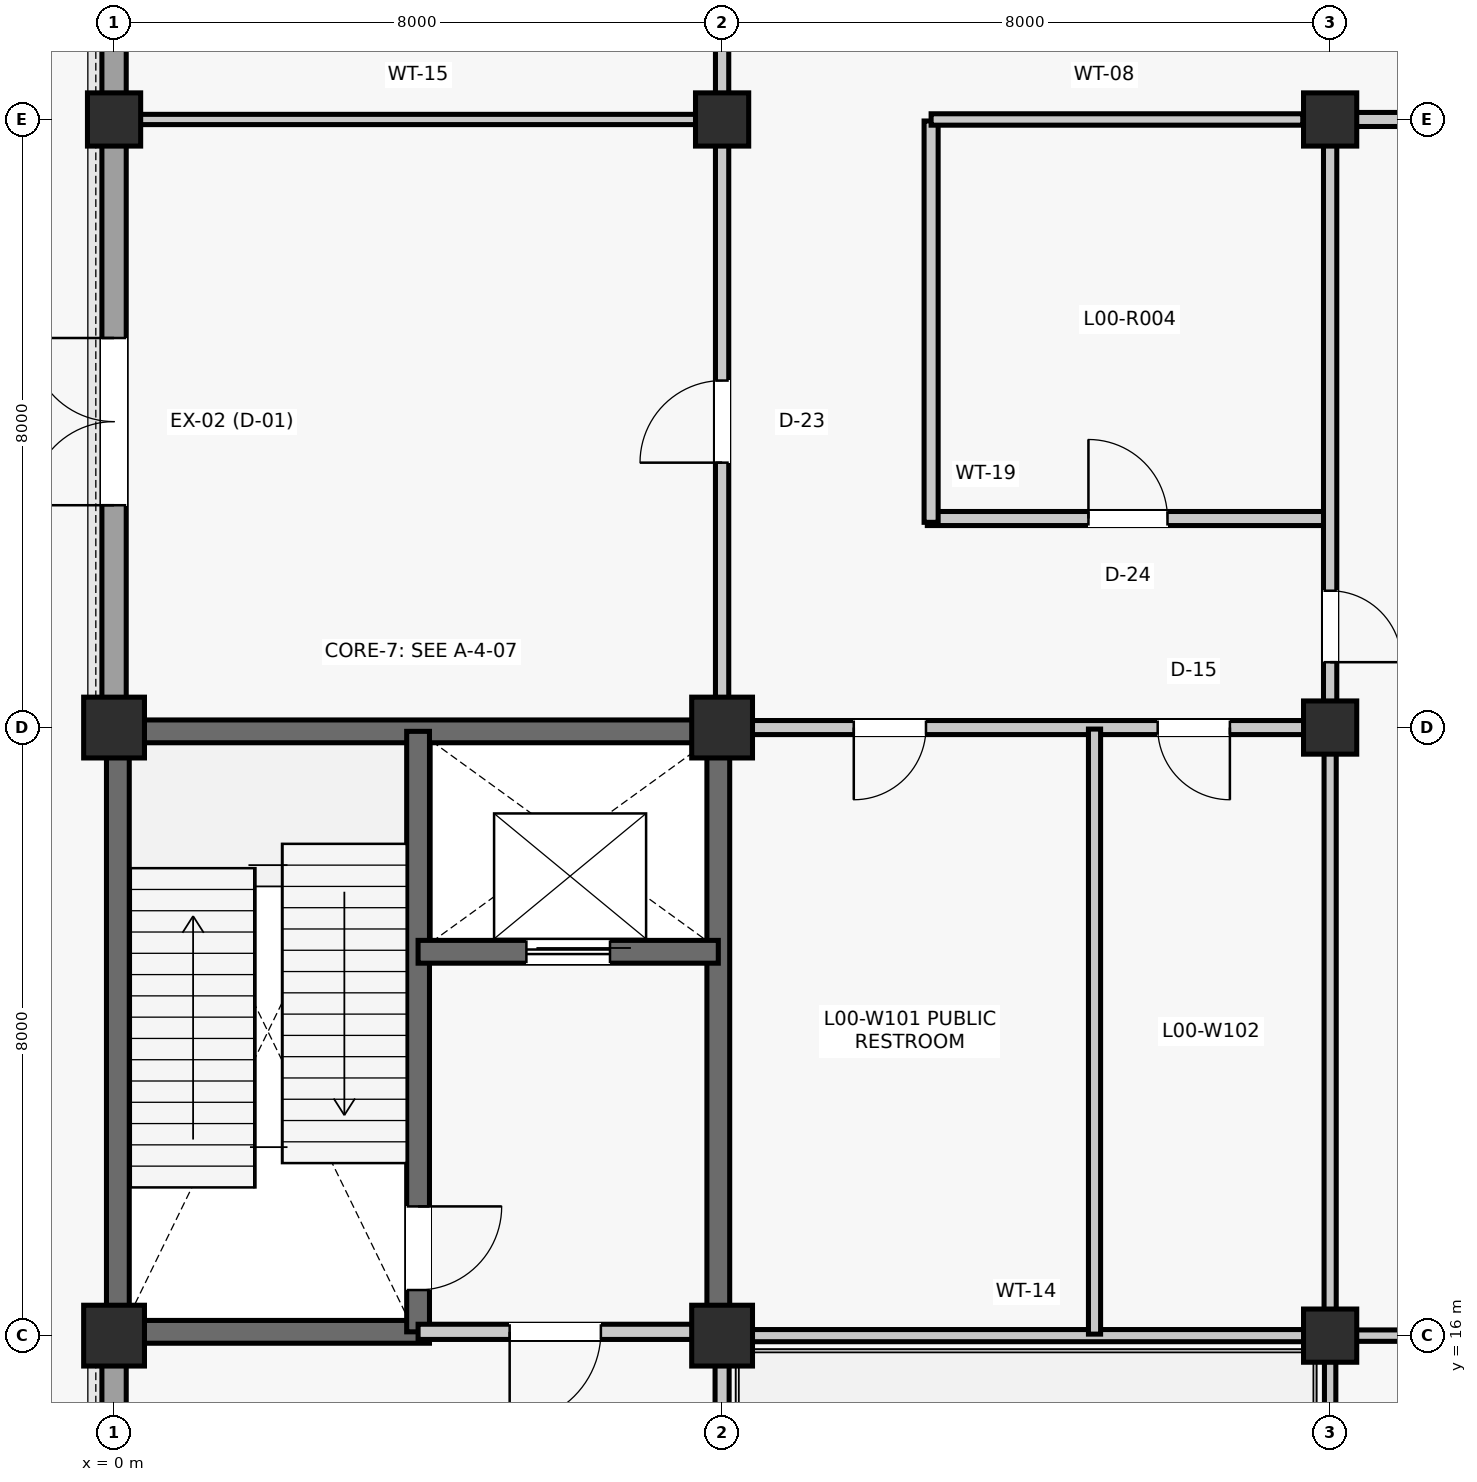
"""IFC4 building model, lengths in metres.
Left out: names, types, materials, properties, quantities, classifications, styles, units other than length and angle.
Written with IfcOpenShell. Run it as: python <this file> out.ifc"""

import sys

from ifc_helpers import new_model, si_unit, direction, frame, frame_2d, origin, origin_2d, place, context, subcontext, project, spatial, rectangle, extrude, element, fill, save


model = new_model("IFC4")
c1 = context("Model", 3, precision=1e-05, world=origin(), true_north=direction((0.0, 1.0)))
c2 = subcontext(c1, "Body", "Model", "MODEL_VIEW")
j1 = project(units=[si_unit("LENGTHUNIT", "METRE"), si_unit("PLANEANGLEUNIT", "RADIAN")], contexts=[c1])
p1 = place(None, origin())
s1 = spatial("IfcSite", under=j1, at=p1, CompositionType="ELEMENT")
p2 = place(p1, origin())
s2 = spatial("IfcBuilding", under=s1, at=p2, CompositionType="ELEMENT")
p3 = place(p2, origin())
s3 = spatial("IfcBuildingStorey", under=s2, at=p3, CompositionType="ELEMENT", Elevation=0.0)
for number, where, z_axis, x_axis in (
    (1, (0.0, 16.0, 0.0), (0.0, 0.0, 1.0), (1.0, 0.0, 0.0)),
    (2, (0.0, 24.0, 0.0), (0.0, 0.0, 1.0), (1.0, 0.0, 0.0)),
):
    element("IfcColumn", number, at=place(p3, frame(where, z_axis=z_axis, x_axis=x_axis)), inside=s3, PredefinedType="COLUMN", context=c2, shape_type="SweptSolid", body=[
        extrude(rectangle(XDim=0.8, YDim=0.8, at=origin_2d()), origin(), (0.0, 0.0, 1.0), 5.28),
    ])
p4 = place(p3, frame((0.0, 32.0, 0.0), z_axis=(0.0, 0.0, 1.0), x_axis=(1.0, 0.0, 0.0)))
e3 = element("IfcColumn", 3, at=p4, inside=s3, PredefinedType="COLUMN", context=c2, shape_type="SweptSolid", body=[
    extrude(rectangle(XDim=0.7, YDim=0.7, at=origin_2d()), origin(), (0.0, 0.0, 1.0), 5.28),
])
for number, where, z_axis, x_axis in (
    (4, (8.0, 16.0, 0.0), (0.0, 0.0, 1.0), (1.0, 0.0, 0.0)),
    (5, (8.0, 24.0, 0.0), (0.0, 0.0, 1.0), (1.0, 0.0, 0.0)),
):
    element("IfcColumn", number, at=place(p3, frame(where, z_axis=z_axis, x_axis=x_axis)), inside=s3, PredefinedType="COLUMN", context=c2, shape_type="SweptSolid", body=[
        extrude(rectangle(XDim=0.8, YDim=0.8, at=origin_2d()), origin(), (0.0, 0.0, 1.0), 5.28),
    ])
for number, where, z_axis, x_axis in (
    (6, (8.0, 32.0, 0.0), (0.0, 0.0, 1.0), (1.0, 0.0, 0.0)),
    (7, (16.0, 16.0, 0.0), (0.0, 0.0, 1.0), (1.0, 0.0, 0.0)),
    (8, (16.0, 24.0, 0.0), (0.0, 0.0, 1.0), (1.0, 0.0, 0.0)),
    (9, (16.0, 32.0, 0.0), (0.0, 0.0, 1.0), (1.0, 0.0, 0.0)),
):
    element("IfcColumn", number, at=place(p3, frame(where, z_axis=z_axis, x_axis=x_axis)), inside=s3, PredefinedType="COLUMN", context=c2, shape_type="SweptSolid", body=[
        extrude(rectangle(XDim=0.7, YDim=0.7, at=origin_2d()), origin(), (0.0, 0.0, 1.0), 5.28),
    ])
p5 = place(p3, frame((0.0, 8.335, 0.0), z_axis=(0.0, 0.0, 1.0), x_axis=(0.0, 1.0, 0.0)))
e10 = element("IfcWall", 10, at=p5, inside=s3, PredefinedType="SOLIDWALL", context=c2, shape_type="SweptSolid", body=[
    extrude(rectangle(XDim=7.28, YDim=0.32, at=frame_2d((3.64, 0.0))), origin(), (0.0, 0.0, 1.0), 4.674),
])
p6 = place(p5, frame((4.25, 0.0, 0.9)))
e11 = element("IfcOpeningElement", 11, at=p6, cuts=e10, PredefinedType="OPENING", context=c2, shape_type="SweptSolid", body=[
    extrude(rectangle(XDim=2.15, YDim=2.8, at=frame_2d((1.075, 1.4))), frame((0.0, 0.17, 0.0), z_axis=(0.0, -1.0, 0.0), x_axis=(1.0, 0.0, 0.0)), (0.0, 0.0, 1.0), 0.34),
])
p7 = place(p3, frame((0.0, 24.385, 0.0), z_axis=(0.0, 0.0, 1.0), x_axis=(0.0, 1.0, 0.0)))
e12 = element("IfcWall", 12, at=p7, inside=s3, PredefinedType="SOLIDWALL", context=c2, shape_type="SweptSolid", body=[
    extrude(rectangle(XDim=7.28, YDim=0.32, at=frame_2d((3.64, 0.0))), origin(), (0.0, 0.0, 1.0), 4.677),
])
p8 = place(p7, frame((2.54, 0.0, 0.0)))
e13 = element("IfcOpeningElement", 13, at=p8, cuts=e12, PredefinedType="OPENING", context=c2, shape_type="SweptSolid", body=[
    extrude(rectangle(XDim=2.2, YDim=2.5, at=frame_2d((1.1, 1.25))), frame((0.0, 0.17, 0.0), z_axis=(0.0, -1.0, 0.0), x_axis=(1.0, 0.0, 0.0)), (0.0, 0.0, 1.0), 0.34),
])
p9 = place(p3, frame((0.0, 32.335, 0.0), z_axis=(0.0, 0.0, 1.0), x_axis=(0.0, 1.0, 0.0)))
e14 = element("IfcWall", 14, at=p9, inside=s3, PredefinedType="SOLIDWALL", context=c2, shape_type="SweptSolid", body=[
    extrude(rectangle(XDim=7.33, YDim=0.32, at=frame_2d((3.665, 0.0))), origin(), (0.0, 0.0, 1.0), 4.61),
])
p10 = place(p9, frame((4.25, 0.0, 0.9)))
e15 = element("IfcOpeningElement", 15, at=p10, cuts=e14, PredefinedType="OPENING", context=c2, shape_type="SweptSolid", body=[
    extrude(rectangle(XDim=2.4, YDim=2.8, at=frame_2d((1.2, 1.4))), frame((0.0, 0.17, 0.0), z_axis=(0.0, -1.0, 0.0), x_axis=(1.0, 0.0, 0.0)), (0.0, 0.0, 1.0), 0.34),
])
for number, where, z_axis, x_axis in (
    (16, (0.05, 16.29, 0.0), (0.0, 0.0, 1.0), (0.0, 1.0, 0.0)),
    (17, (0.29, 23.95, 0.0), (0.0, 0.0, 1.0), (1.0, 0.0, 0.0)),
    (18, (7.95, 16.29, 0.0), (0.0, 0.0, 1.0), (0.0, 1.0, 0.0)),
):
    element("IfcWall", number, at=place(p3, frame(where, z_axis=z_axis, x_axis=x_axis)), inside=s3, PredefinedType="SHEAR", context=c2, shape_type="SweptSolid", body=[
        extrude(rectangle(XDim=7.42, YDim=0.3, at=frame_2d((3.71, 0.0))), origin(), (0.0, 0.0, 1.0), 5.035),
    ])
p11 = place(p3, frame((0.29, 16.05, 0.0), z_axis=(0.0, 0.0, 1.0), x_axis=(1.0, 0.0, 0.0)))
e19 = element("IfcWall", 19, at=p11, inside=s3, PredefinedType="SHEAR", context=c2, shape_type="SweptSolid", body=[
    extrude(rectangle(XDim=3.86, YDim=0.3, at=frame_2d((1.93, 0.0))), origin(), (0.0, 0.0, 1.0), 5.035),
])
p12 = place(p3, frame((4.0, 16.05, 0.0), z_axis=(0.0, 0.0, 1.0), x_axis=(0.0, 1.0, 0.0)))
e20 = element("IfcWall", 20, at=p12, inside=s3, PredefinedType="SHEAR", context=c2, shape_type="SweptSolid", body=[
    extrude(rectangle(XDim=7.9, YDim=0.3, at=frame_2d((3.95, 0.0))), origin(), (0.0, 0.0, 1.0), 5.035),
])
p13 = place(p12, frame((0.55, 0.0, 0.0)))
e21 = element("IfcOpeningElement", 21, at=p13, cuts=e20, PredefinedType="OPENING", context=c2, shape_type="SweptSolid", body=[
    extrude(rectangle(XDim=1.1, YDim=2.15, at=frame_2d((0.55, 1.075))), frame((0.0, 0.16, 0.0), z_axis=(0.0, -1.0, 0.0), x_axis=(1.0, 0.0, 0.0)), (0.0, 0.0, 1.0), 0.32),
])
p14 = place(p3, frame((4.0, 21.05, 0.0), z_axis=(0.0, 0.0, 1.0), x_axis=(1.0, 0.0, 0.0)))
e22 = element("IfcWall", 22, at=p14, inside=s3, PredefinedType="SHEAR", context=c2, shape_type="SweptSolid", body=[
    extrude(rectangle(XDim=3.95, YDim=0.3, at=frame_2d((1.975, 0.0))), origin(), (0.0, 0.0, 1.0), 5.035),
])
p15 = place(p14, frame((1.425, 0.0, 0.0)))
e23 = element("IfcOpeningElement", 23, at=p15, cuts=e22, PredefinedType="OPENING", context=c2, shape_type="SweptSolid", body=[
    extrude(rectangle(XDim=1.1, YDim=2.2, at=frame_2d((0.55, 1.1))), frame((0.0, 0.16, 0.0), z_axis=(0.0, -1.0, 0.0), x_axis=(1.0, 0.0, 0.0)), (0.0, 0.0, 1.0), 0.32),
])
p16 = place(p3, frame((4.0, 16.05, 0.0), z_axis=(0.0, 0.0, 1.0), x_axis=(1.0, 0.0, 0.0)))
e24 = element("IfcWall", 24, at=p16, inside=s3, PredefinedType="PARTITIONING", context=c2, shape_type="SweptSolid", body=[
    extrude(rectangle(XDim=3.61, YDim=0.2, at=frame_2d((1.805, 0.0))), origin(), (0.0, 0.0, 1.0), 4.336),
])
p17 = place(p16, frame((1.205, 0.0, 0.0)))
e25 = element("IfcOpeningElement", 25, at=p17, cuts=e24, PredefinedType="OPENING", context=c2, shape_type="SweptSolid", body=[
    extrude(rectangle(XDim=1.2, YDim=2.15, at=frame_2d((0.6, 1.075))), frame((0.0, 0.11, 0.0), z_axis=(0.0, -1.0, 0.0), x_axis=(1.0, 0.0, 0.0)), (0.0, 0.0, 1.0), 0.22),
])
p18 = place(p3, frame((10.7, 26.75, 0.0), z_axis=(0.0, 0.0, 1.0), x_axis=(1.0, 0.0, 0.0)))
e26 = element("IfcWall", 26, at=p18, inside=s3, PredefinedType="PARTITIONING", context=c2, shape_type="SweptSolid", body=[
    extrude(rectangle(XDim=5.28, YDim=0.185, at=frame_2d((2.64, 0.0))), origin(), (0.0, 0.0, 1.0), 4.667),
])
p19 = place(p18, frame((2.12, 0.0, 0.0)))
e27 = element("IfcOpeningElement", 27, at=p19, cuts=e26, PredefinedType="OPENING", context=c2, shape_type="SweptSolid", body=[
    extrude(rectangle(XDim=1.04, YDim=2.18, at=frame_2d((0.52, 1.09))), frame((0.0, 0.103, 0.0), z_axis=(0.0, -1.0, 0.0), x_axis=(1.0, 0.0, 0.0)), (0.0, 0.0, 1.0), 0.205),
])
p20 = place(p3, frame((10.75, 26.7, 0.0), z_axis=(0.0, 0.0, 1.0), x_axis=(0.0, 1.0, 0.0)))
e28 = element("IfcWall", 28, at=p20, inside=s3, PredefinedType="PARTITIONING", context=c2, shape_type="SweptSolid", body=[
    extrude(rectangle(XDim=5.28, YDim=0.185, at=frame_2d((2.64, 0.0))), origin(), (0.0, 0.0, 1.0), 4.403),
])
p21 = place(p3, frame((10.75, 32.0, 0.0), z_axis=(0.0, 0.0, 1.0), x_axis=(1.0, 0.0, 0.0)))
e29 = element("IfcWall", 29, at=p21, inside=s3, PredefinedType="PARTITIONING", context=c2, shape_type="SweptSolid", body=[
    extrude(rectangle(XDim=4.89, YDim=0.15, at=frame_2d((2.445, 0.0))), origin(), (0.0, 0.0, 1.0), 4.403),
])
p22 = place(p3, frame((8.0, 8.34, 0.0), z_axis=(0.0, 0.0, 1.0), x_axis=(0.0, 1.0, 0.0)))
e30 = element("IfcWall", 30, at=p22, inside=s3, PredefinedType="PARTITIONING", context=c2, shape_type="SweptSolid", body=[
    extrude(rectangle(XDim=7.27, YDim=0.185, at=frame_2d((3.635, 0.0))), origin(), (0.0, 0.0, 1.0), 4.404),
])
p23 = place(p22, frame((2.985, 0.0, 0.0)))
e31 = element("IfcOpeningElement", 31, at=p23, cuts=e30, PredefinedType="OPENING", context=c2, shape_type="SweptSolid", body=[
    extrude(rectangle(XDim=1.3, YDim=2.2, at=frame_2d((0.65, 1.1))), frame((0.0, 0.103, 0.0), z_axis=(0.0, -1.0, 0.0), x_axis=(1.0, 0.0, 0.0)), (0.0, 0.0, 1.0), 0.205),
])
p24 = place(p3, frame((8.0, 24.39, 0.0), z_axis=(0.0, 0.0, 1.0), x_axis=(0.0, 1.0, 0.0)))
e32 = element("IfcWall", 32, at=p24, inside=s3, PredefinedType="PARTITIONING", context=c2, shape_type="SweptSolid", body=[
    extrude(rectangle(XDim=7.27, YDim=0.175, at=frame_2d((3.635, 0.0))), origin(), (0.0, 0.0, 1.0), 4.403),
])
p25 = place(p24, frame((3.095, 0.0, 0.0)))
e33 = element("IfcOpeningElement", 33, at=p25, cuts=e32, PredefinedType="OPENING", context=c2, shape_type="SweptSolid", body=[
    extrude(rectangle(XDim=1.08, YDim=2.2, at=frame_2d((0.54, 1.1))), frame((0.0, 0.097, 0.0), z_axis=(0.0, -1.0, 0.0), x_axis=(1.0, 0.0, 0.0)), (0.0, 0.0, 1.0), 0.195),
])
p26 = place(p3, frame((0.34, 32.0, 0.0), z_axis=(0.0, 0.0, 1.0), x_axis=(1.0, 0.0, 0.0)))
e34 = element("IfcWall", 34, at=p26, inside=s3, PredefinedType="PARTITIONING", context=c2, shape_type="SweptSolid", body=[
    extrude(rectangle(XDim=7.32, YDim=0.135, at=frame_2d((3.66, 0.0))), origin(), (0.0, 0.0, 1.0), 4.327),
])
p27 = place(p3, frame((8.0, 32.34, 0.0), z_axis=(0.0, 0.0, 1.0), x_axis=(0.0, 1.0, 0.0)))
e35 = element("IfcWall", 35, at=p27, inside=s3, PredefinedType="PARTITIONING", context=c2, shape_type="SweptSolid", body=[
    extrude(rectangle(XDim=7.32, YDim=0.175, at=frame_2d((3.66, 0.0))), origin(), (0.0, 0.0, 1.0), 4.412),
])
p28 = place(p27, frame((3.18, 0.0, 0.0)))
e36 = element("IfcOpeningElement", 36, at=p28, cuts=e35, PredefinedType="OPENING", context=c2, shape_type="SweptSolid", body=[
    extrude(rectangle(XDim=0.96, YDim=2.14, at=frame_2d((0.48, 1.07))), frame((0.0, 0.097, 0.0), z_axis=(0.0, -1.0, 0.0), x_axis=(1.0, 0.0, 0.0)), (0.0, 0.0, 1.0), 0.195),
])
p29 = place(p3, frame((16.0, 8.34, 0.0), z_axis=(0.0, 0.0, 1.0), x_axis=(0.0, 1.0, 0.0)))
e37 = element("IfcWall", 37, at=p29, inside=s3, PredefinedType="PARTITIONING", context=c2, shape_type="SweptSolid", body=[
    extrude(rectangle(XDim=7.32, YDim=0.15, at=frame_2d((3.66, 0.0))), origin(), (0.0, 0.0, 1.0), 4.471),
])
p30 = place(p3, frame((8.39, 16.0, 0.0), z_axis=(0.0, 0.0, 1.0), x_axis=(1.0, 0.0, 0.0)))
e38 = element("IfcWall", 38, at=p30, inside=s3, PredefinedType="PARTITIONING", context=c2, shape_type="SweptSolid", body=[
    extrude(rectangle(XDim=7.27, YDim=0.16, at=frame_2d((3.635, 0.0))), origin(), (0.0, 0.0, 1.0), 4.404),
])
p31 = place(p3, frame((16.0, 16.34, 0.0), z_axis=(0.0, 0.0, 1.0), x_axis=(0.0, 1.0, 0.0)))
e39 = element("IfcWall", 39, at=p31, inside=s3, PredefinedType="PARTITIONING", context=c2, shape_type="SweptSolid", body=[
    extrude(rectangle(XDim=7.32, YDim=0.16, at=frame_2d((3.66, 0.0))), origin(), (0.0, 0.0, 1.0), 4.603),
])
p32 = place(p3, frame((8.39, 24.0, 0.0), z_axis=(0.0, 0.0, 1.0), x_axis=(1.0, 0.0, 0.0)))
e40 = element("IfcWall", 40, at=p32, inside=s3, PredefinedType="PARTITIONING", context=c2, shape_type="SweptSolid", body=[
    extrude(rectangle(XDim=7.27, YDim=0.185, at=frame_2d((3.635, 0.0))), origin(), (0.0, 0.0, 1.0), 4.327),
])
p33 = place(p32, frame((1.343, 0.0, 0.0)))
e41 = element("IfcOpeningElement", 41, at=p33, cuts=e40, PredefinedType="OPENING", context=c2, shape_type="SweptSolid", body=[
    extrude(rectangle(XDim=0.95, YDim=2.1, at=frame_2d((0.475, 1.05))), frame((0.0, 0.103, 0.0), z_axis=(0.0, -1.0, 0.0), x_axis=(1.0, 0.0, 0.0)), (0.0, 0.0, 1.0), 0.205),
])
p34 = place(p32, frame((5.341, 0.0, 0.0)))
e42 = element("IfcOpeningElement", 42, at=p34, cuts=e40, PredefinedType="OPENING", context=c2, shape_type="SweptSolid", body=[
    extrude(rectangle(XDim=0.95, YDim=2.1, at=frame_2d((0.475, 1.05))), frame((0.0, 0.103, 0.0), z_axis=(0.0, -1.0, 0.0), x_axis=(1.0, 0.0, 0.0)), (0.0, 0.0, 1.0), 0.205),
])
p35 = place(p3, frame((16.0, 24.34, 0.0), z_axis=(0.0, 0.0, 1.0), x_axis=(0.0, 1.0, 0.0)))
e43 = element("IfcWall", 43, at=p35, inside=s3, PredefinedType="PARTITIONING", context=c2, shape_type="SweptSolid", body=[
    extrude(rectangle(XDim=7.32, YDim=0.175, at=frame_2d((3.66, 0.0))), origin(), (0.0, 0.0, 1.0), 4.667),
])
p36 = place(p35, frame((0.52, 0.0, 0.0)))
e44 = element("IfcOpeningElement", 44, at=p36, cuts=e43, PredefinedType="OPENING", context=c2, shape_type="SweptSolid", body=[
    extrude(rectangle(XDim=0.94, YDim=2.12, at=frame_2d((0.47, 1.06))), frame((0.0, 0.097, 0.0), z_axis=(0.0, -1.0, 0.0), x_axis=(1.0, 0.0, 0.0)), (0.0, 0.0, 1.0), 0.195),
])
p37 = place(p3, frame((16.34, 16.0, 0.0), z_axis=(0.0, 0.0, 1.0), x_axis=(1.0, 0.0, 0.0)))
e45 = element("IfcWall", 45, at=p37, inside=s3, PredefinedType="PARTITIONING", context=c2, shape_type="SweptSolid", body=[
    extrude(rectangle(XDim=7.32, YDim=0.15, at=frame_2d((3.66, 0.0))), origin(), (0.0, 0.0, 1.0), 4.603),
])
p38 = place(p3, frame((16.34, 32.0, 0.0), z_axis=(0.0, 0.0, 1.0), x_axis=(1.0, 0.0, 0.0)))
e46 = element("IfcWall", 46, at=p38, inside=s3, PredefinedType="PARTITIONING", context=c2, shape_type="SweptSolid", body=[
    extrude(rectangle(XDim=7.32, YDim=0.185, at=frame_2d((3.66, 0.0))), origin(), (0.0, 0.0, 1.0), 4.607),
])
p39 = place(p38, frame((2.76, 0.0, 0.0)))
e47 = element("IfcOpeningElement", 47, at=p39, cuts=e46, PredefinedType="OPENING", context=c2, shape_type="SweptSolid", body=[
    extrude(rectangle(XDim=1.8, YDim=2.35, at=frame_2d((0.9, 1.175))), frame((0.0, 0.103, 0.0), z_axis=(0.0, -1.0, 0.0), x_axis=(1.0, 0.0, 0.0)), (0.0, 0.0, 1.0), 0.205),
])
p40 = place(p3, frame((12.9, 16.02, 0.0), z_axis=(0.0, 0.0, 1.0), x_axis=(0.0, 1.0, 0.0)))
e48 = element("IfcWall", 48, at=p40, inside=s3, PredefinedType="PARTITIONING", context=c2, shape_type="SweptSolid", body=[
    extrude(rectangle(XDim=7.96, YDim=0.16, at=frame_2d((3.98, 0.0))), origin(), (0.0, 0.0, 1.0), 4.327),
])
p41 = place(p8, origin())
e49 = element("IfcDoor", 49, at=p41, inside=s3, OperationType="DOUBLE_DOOR_SINGLE_SWING", PredefinedType="DOOR", context=c2, shape_type="SweptSolid", body=[
    extrude(rectangle(XDim=2.2, YDim=2.5, at=frame_2d((1.1, 1.25))), frame((0.0, 0.025, 0.0), z_axis=(0.0, -1.0, 0.0), x_axis=(1.0, 0.0, 0.0)), (0.0, 0.0, 1.0), 0.05),
])
fill(e13, e49)
p42 = place(p13, frame((1.1, 0.0, 0.0), z_axis=(0.0, 0.0, 1.0), x_axis=(-1.0, 0.0, 0.0)))
e50 = element("IfcDoor", 50, at=p42, inside=s3, OperationType="SINGLE_SWING_RIGHT", PredefinedType="DOOR", context=c2, shape_type="SweptSolid", body=[
    extrude(rectangle(XDim=1.1, YDim=2.15, at=frame_2d((0.55, 1.075))), frame((0.0, 0.025, 0.0), z_axis=(0.0, -1.0, 0.0), x_axis=(1.0, 0.0, 0.0)), (0.0, 0.0, 1.0), 0.05),
])
fill(e21, e50)
p43 = place(p15, origin())
e51 = element("IfcDoor", 51, at=p43, inside=s3, OperationType="SLIDING_TO_LEFT", PredefinedType="DOOR", context=c2, shape_type="SweptSolid", body=[
    extrude(rectangle(XDim=1.1, YDim=2.2, at=frame_2d((0.55, 1.1))), frame((0.0, 0.025, 0.0), z_axis=(0.0, -1.0, 0.0), x_axis=(1.0, 0.0, 0.0)), (0.0, 0.0, 1.0), 0.05),
])
fill(e23, e51)
p44 = place(p17, frame((1.2, 0.0, 0.0), z_axis=(0.0, 0.0, 1.0), x_axis=(-1.0, 0.0, 0.0)))
e52 = element("IfcDoor", 52, at=p44, inside=s3, OperationType="SINGLE_SWING_LEFT", PredefinedType="DOOR", context=c2, shape_type="SweptSolid", body=[
    extrude(rectangle(XDim=1.2, YDim=2.15, at=frame_2d((0.6, 1.075))), frame((0.0, 0.025, 0.0), z_axis=(0.0, -1.0, 0.0), x_axis=(1.0, 0.0, 0.0)), (0.0, 0.0, 1.0), 0.05),
])
fill(e25, e52)
p45 = place(p19, origin())
e53 = element("IfcDoor", 53, at=p45, inside=s3, OperationType="SINGLE_SWING_LEFT", PredefinedType="DOOR", context=c2, shape_type="SweptSolid", body=[
    extrude(rectangle(XDim=1.04, YDim=2.18, at=frame_2d((0.52, 1.09))), frame((0.0, 0.025, 0.0), z_axis=(0.0, -1.0, 0.0), x_axis=(1.0, 0.0, 0.0)), (0.0, 0.0, 1.0), 0.05),
])
fill(e27, e53)
p46 = place(p25, origin())
e54 = element("IfcDoor", 54, at=p46, inside=s3, OperationType="SINGLE_SWING_LEFT", PredefinedType="DOOR", context=c2, shape_type="SweptSolid", body=[
    extrude(rectangle(XDim=1.08, YDim=2.2, at=frame_2d((0.54, 1.1))), frame((0.0, 0.025, 0.0), z_axis=(0.0, -1.0, 0.0), x_axis=(1.0, 0.0, 0.0)), (0.0, 0.0, 1.0), 0.05),
])
fill(e33, e54)
p47 = place(p33, frame((0.95, 0.0, 0.0), z_axis=(0.0, 0.0, 1.0), x_axis=(-1.0, 0.0, 0.0)))
e55 = element("IfcDoor", 55, at=p47, inside=s3, OperationType="SINGLE_SWING_LEFT", PredefinedType="DOOR", context=c2, shape_type="SweptSolid", body=[
    extrude(rectangle(XDim=0.95, YDim=2.1, at=frame_2d((0.475, 1.05))), frame((0.0, 0.025, 0.0), z_axis=(0.0, -1.0, 0.0), x_axis=(1.0, 0.0, 0.0)), (0.0, 0.0, 1.0), 0.05),
])
fill(e41, e55)
p48 = place(p34, frame((0.95, 0.0, 0.0), z_axis=(0.0, 0.0, 1.0), x_axis=(-1.0, 0.0, 0.0)))
e56 = element("IfcDoor", 56, at=p48, inside=s3, OperationType="SINGLE_SWING_RIGHT", PredefinedType="DOOR", context=c2, shape_type="SweptSolid", body=[
    extrude(rectangle(XDim=0.95, YDim=2.1, at=frame_2d((0.475, 1.05))), frame((0.0, 0.025, 0.0), z_axis=(0.0, -1.0, 0.0), x_axis=(1.0, 0.0, 0.0)), (0.0, 0.0, 1.0), 0.05),
])
fill(e42, e56)
p49 = place(p36, frame((0.94, 0.0, 0.0), z_axis=(0.0, 0.0, 1.0), x_axis=(-1.0, 0.0, 0.0)))
e57 = element("IfcDoor", 57, at=p49, inside=s3, OperationType="SINGLE_SWING_LEFT", PredefinedType="DOOR", context=c2, shape_type="SweptSolid", body=[
    extrude(rectangle(XDim=0.94, YDim=2.12, at=frame_2d((0.47, 1.06))), frame((0.0, 0.025, 0.0), z_axis=(0.0, -1.0, 0.0), x_axis=(1.0, 0.0, 0.0)), (0.0, 0.0, 1.0), 0.05),
])
fill(e44, e57)
save(model, sys.argv[1])
